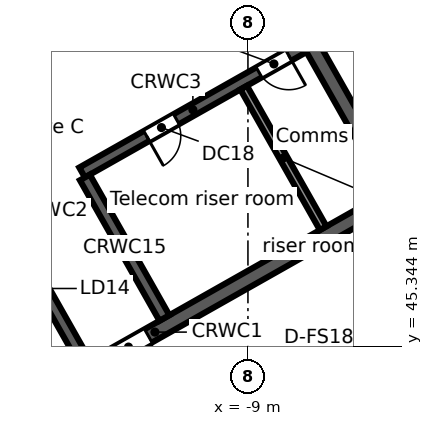
"""IFC4 building model, lengths in metres.
Left out: names, types, materials, properties, quantities, classifications, styles, units other than length and angle.
Written with IfcOpenShell. Run it as: python <this file> out.ifc"""

import sys

from ifc_helpers import new_model, si_unit, direction, frame, frame_2d, origin, place, context, subcontext, project, spatial, rectangle, extrude, element, fill, save


model = new_model("IFC4")
c1 = context("Model", 3, precision=1e-05, world=origin(), true_north=direction((0.0, 1.0)))
c2 = subcontext(c1, "Body", "Model", "MODEL_VIEW")
j1 = project(units=[si_unit("LENGTHUNIT", "METRE"), si_unit("PLANEANGLEUNIT", "RADIAN")], contexts=[c1])
p1 = place(None, origin())
s1 = spatial("IfcSite", under=j1, at=p1, CompositionType="ELEMENT")
p2 = place(p1, origin())
s2 = spatial("IfcBuilding", under=s1, at=p2, CompositionType="ELEMENT")
p3 = place(p2, frame((0.0, 0.0, 274.1)))
s3 = spatial("IfcBuildingStorey", under=s2, at=p3, CompositionType="ELEMENT", Elevation=274.1)
p4 = place(p3, frame((-58.732, 38.771, 0.0), z_axis=(0.0, 0.0, 1.0), x_axis=(0.870355615581, 0.492423702137, 0.0)))
e1 = element("IfcWall", 1, at=p4, inside=s3, PredefinedType="STANDARD", context=c2, shape_type="SweptSolid", body=[
    extrude(rectangle(XDim=64.052, YDim=0.25, at=frame_2d((32.026, 0.0))), origin(), (0.0, 0.0, 1.0), 3.52),
])
p5 = place(p4, frame((61.259, 0.0, 0.8)))
e2 = element("IfcOpeningElement", 2, at=p5, cuts=e1, PredefinedType="OPENING", context=c2, shape_type="SweptSolid", body=[
    extrude(rectangle(XDim=2.4, YDim=2.2, at=frame_2d((1.2, 1.1))), frame((0.0, 0.135, 0.0), z_axis=(0.0, -1.0, 0.0), x_axis=(1.0, 0.0, 0.0)), (0.0, 0.0, 1.0), 0.27),
])
p6 = place(p4, frame((58.216, 0.0, 0.8)))
e3 = element("IfcOpeningElement", 3, at=p6, cuts=e1, PredefinedType="OPENING", context=c2, shape_type="SweptSolid", body=[
    extrude(rectangle(XDim=2.4, YDim=2.2, at=frame_2d((1.2, 1.1))), frame((0.0, 0.135, 0.0), z_axis=(0.0, -1.0, 0.0), x_axis=(1.0, 0.0, 0.0)), (0.0, 0.0, 1.0), 0.27),
])
p7 = place(p4, frame((55.173, 0.0, 0.8)))
e4 = element("IfcOpeningElement", 4, at=p7, cuts=e1, PredefinedType="OPENING", context=c2, shape_type="SweptSolid", body=[
    extrude(rectangle(XDim=2.4, YDim=2.2, at=frame_2d((1.2, 1.1))), frame((0.0, 0.135, 0.0), z_axis=(0.0, -1.0, 0.0), x_axis=(1.0, 0.0, 0.0)), (0.0, 0.0, 1.0), 0.27),
])
p8 = place(p4, frame((52.129, 0.0, 0.8)))
e5 = element("IfcOpeningElement", 5, at=p8, cuts=e1, PredefinedType="OPENING", context=c2, shape_type="SweptSolid", body=[
    extrude(rectangle(XDim=2.4, YDim=2.2, at=frame_2d((1.2, 1.1))), frame((0.0, 0.135, 0.0), z_axis=(0.0, -1.0, 0.0), x_axis=(1.0, 0.0, 0.0)), (0.0, 0.0, 1.0), 0.27),
])
p9 = place(p4, frame((49.086, 0.0, 0.8)))
e6 = element("IfcOpeningElement", 6, at=p9, cuts=e1, PredefinedType="OPENING", context=c2, shape_type="SweptSolid", body=[
    extrude(rectangle(XDim=2.4, YDim=2.2, at=frame_2d((1.2, 1.1))), frame((0.0, 0.135, 0.0), z_axis=(0.0, -1.0, 0.0), x_axis=(1.0, 0.0, 0.0)), (0.0, 0.0, 1.0), 0.27),
])
p10 = place(p4, frame((46.043, 0.0, 0.8)))
e7 = element("IfcOpeningElement", 7, at=p10, cuts=e1, PredefinedType="OPENING", context=c2, shape_type="SweptSolid", body=[
    extrude(rectangle(XDim=2.4, YDim=2.2, at=frame_2d((1.2, 1.1))), frame((0.0, 0.135, 0.0), z_axis=(0.0, -1.0, 0.0), x_axis=(1.0, 0.0, 0.0)), (0.0, 0.0, 1.0), 0.27),
])
p11 = place(p4, frame((43.0, 0.0, 0.8)))
e8 = element("IfcOpeningElement", 8, at=p11, cuts=e1, PredefinedType="OPENING", context=c2, shape_type="SweptSolid", body=[
    extrude(rectangle(XDim=2.4, YDim=2.2, at=frame_2d((1.2, 1.1))), frame((0.0, 0.135, 0.0), z_axis=(0.0, -1.0, 0.0), x_axis=(1.0, 0.0, 0.0)), (0.0, 0.0, 1.0), 0.27),
])
p12 = place(p4, frame((39.956, 0.0, 0.8)))
e9 = element("IfcOpeningElement", 9, at=p12, cuts=e1, PredefinedType="OPENING", context=c2, shape_type="SweptSolid", body=[
    extrude(rectangle(XDim=2.4, YDim=2.2, at=frame_2d((1.2, 1.1))), frame((0.0, 0.135, 0.0), z_axis=(0.0, -1.0, 0.0), x_axis=(1.0, 0.0, 0.0)), (0.0, 0.0, 1.0), 0.27),
])
p13 = place(p4, frame((36.913, 0.0, 0.8)))
e10 = element("IfcOpeningElement", 10, at=p13, cuts=e1, PredefinedType="OPENING", context=c2, shape_type="SweptSolid", body=[
    extrude(rectangle(XDim=2.4, YDim=2.2, at=frame_2d((1.2, 1.1))), frame((0.0, 0.135, 0.0), z_axis=(0.0, -1.0, 0.0), x_axis=(1.0, 0.0, 0.0)), (0.0, 0.0, 1.0), 0.27),
])
p14 = place(p4, frame((33.87, 0.0, 0.8)))
e11 = element("IfcOpeningElement", 11, at=p14, cuts=e1, PredefinedType="OPENING", context=c2, shape_type="SweptSolid", body=[
    extrude(rectangle(XDim=2.4, YDim=2.2, at=frame_2d((1.2, 1.1))), frame((0.0, 0.135, 0.0), z_axis=(0.0, -1.0, 0.0), x_axis=(1.0, 0.0, 0.0)), (0.0, 0.0, 1.0), 0.27),
])
p15 = place(p4, frame((30.826, 0.0, 0.8)))
e12 = element("IfcOpeningElement", 12, at=p15, cuts=e1, PredefinedType="OPENING", context=c2, shape_type="SweptSolid", body=[
    extrude(rectangle(XDim=2.4, YDim=2.2, at=frame_2d((1.2, 1.1))), frame((0.0, 0.135, 0.0), z_axis=(0.0, -1.0, 0.0), x_axis=(1.0, 0.0, 0.0)), (0.0, 0.0, 1.0), 0.27),
])
p16 = place(p4, frame((27.783, 0.0, 0.8)))
e13 = element("IfcOpeningElement", 13, at=p16, cuts=e1, PredefinedType="OPENING", context=c2, shape_type="SweptSolid", body=[
    extrude(rectangle(XDim=2.4, YDim=2.2, at=frame_2d((1.2, 1.1))), frame((0.0, 0.135, 0.0), z_axis=(0.0, -1.0, 0.0), x_axis=(1.0, 0.0, 0.0)), (0.0, 0.0, 1.0), 0.27),
])
p17 = place(p4, frame((24.74, 0.0, 0.8)))
e14 = element("IfcOpeningElement", 14, at=p17, cuts=e1, PredefinedType="OPENING", context=c2, shape_type="SweptSolid", body=[
    extrude(rectangle(XDim=2.4, YDim=2.2, at=frame_2d((1.2, 1.1))), frame((0.0, 0.135, 0.0), z_axis=(0.0, -1.0, 0.0), x_axis=(1.0, 0.0, 0.0)), (0.0, 0.0, 1.0), 0.27),
])
p18 = place(p4, frame((21.696, 0.0, 0.8)))
e15 = element("IfcOpeningElement", 15, at=p18, cuts=e1, PredefinedType="OPENING", context=c2, shape_type="SweptSolid", body=[
    extrude(rectangle(XDim=2.4, YDim=2.2, at=frame_2d((1.2, 1.1))), frame((0.0, 0.135, 0.0), z_axis=(0.0, -1.0, 0.0), x_axis=(1.0, 0.0, 0.0)), (0.0, 0.0, 1.0), 0.27),
])
p19 = place(p4, frame((18.653, 0.0, 0.8)))
e16 = element("IfcOpeningElement", 16, at=p19, cuts=e1, PredefinedType="OPENING", context=c2, shape_type="SweptSolid", body=[
    extrude(rectangle(XDim=2.4, YDim=2.2, at=frame_2d((1.2, 1.1))), frame((0.0, 0.135, 0.0), z_axis=(0.0, -1.0, 0.0), x_axis=(1.0, 0.0, 0.0)), (0.0, 0.0, 1.0), 0.27),
])
p20 = place(p4, frame((15.61, 0.0, 0.8)))
e17 = element("IfcOpeningElement", 17, at=p20, cuts=e1, PredefinedType="OPENING", context=c2, shape_type="SweptSolid", body=[
    extrude(rectangle(XDim=2.4, YDim=2.2, at=frame_2d((1.2, 1.1))), frame((0.0, 0.135, 0.0), z_axis=(0.0, -1.0, 0.0), x_axis=(1.0, 0.0, 0.0)), (0.0, 0.0, 1.0), 0.27),
])
p21 = place(p4, frame((12.567, 0.0, 0.8)))
e18 = element("IfcOpeningElement", 18, at=p21, cuts=e1, PredefinedType="OPENING", context=c2, shape_type="SweptSolid", body=[
    extrude(rectangle(XDim=2.4, YDim=2.2, at=frame_2d((1.2, 1.1))), frame((0.0, 0.135, 0.0), z_axis=(0.0, -1.0, 0.0), x_axis=(1.0, 0.0, 0.0)), (0.0, 0.0, 1.0), 0.27),
])
p22 = place(p4, frame((9.523, 0.0, 0.8)))
e19 = element("IfcOpeningElement", 19, at=p22, cuts=e1, PredefinedType="OPENING", context=c2, shape_type="SweptSolid", body=[
    extrude(rectangle(XDim=2.4, YDim=2.2, at=frame_2d((1.2, 1.1))), frame((0.0, 0.135, 0.0), z_axis=(0.0, -1.0, 0.0), x_axis=(1.0, 0.0, 0.0)), (0.0, 0.0, 1.0), 0.27),
])
p23 = place(p4, frame((6.48, 0.0, 0.8)))
e20 = element("IfcOpeningElement", 20, at=p23, cuts=e1, PredefinedType="OPENING", context=c2, shape_type="SweptSolid", body=[
    extrude(rectangle(XDim=2.4, YDim=2.2, at=frame_2d((1.2, 1.1))), frame((0.0, 0.135, 0.0), z_axis=(0.0, -1.0, 0.0), x_axis=(1.0, 0.0, 0.0)), (0.0, 0.0, 1.0), 0.27),
])
p24 = place(p4, frame((3.437, 0.0, 0.8)))
e21 = element("IfcOpeningElement", 21, at=p24, cuts=e1, PredefinedType="OPENING", context=c2, shape_type="SweptSolid", body=[
    extrude(rectangle(XDim=2.4, YDim=2.2, at=frame_2d((1.2, 1.1))), frame((0.0, 0.135, 0.0), z_axis=(0.0, -1.0, 0.0), x_axis=(1.0, 0.0, 0.0)), (0.0, 0.0, 1.0), 0.27),
])
p25 = place(p4, frame((0.393, 0.0, 0.8)))
e22 = element("IfcOpeningElement", 22, at=p25, cuts=e1, PredefinedType="OPENING", context=c2, shape_type="SweptSolid", body=[
    extrude(rectangle(XDim=2.4, YDim=2.2, at=frame_2d((1.2, 1.1))), frame((0.0, 0.135, 0.0), z_axis=(0.0, -1.0, 0.0), x_axis=(1.0, 0.0, 0.0)), (0.0, 0.0, 1.0), 0.27),
])
p26 = place(p3, frame((-3.017, 46.293, 0.0), z_axis=(0.0, 0.0, 1.0), x_axis=(-0.870355474887, -0.492423950812, 0.0)))
e23 = element("IfcWall", 23, at=p26, inside=s3, PredefinedType="STANDARD", context=c2, shape_type="SweptSolid", body=[
    extrude(rectangle(XDim=40.34, YDim=0.25, at=frame_2d((20.17, 0.0))), origin(), (0.0, 0.0, 1.0), 3.52),
])
p27 = place(p26, frame((37.428, 0.0, 0.8)))
e24 = element("IfcOpeningElement", 24, at=p27, cuts=e23, PredefinedType="OPENING", context=c2, shape_type="SweptSolid", body=[
    extrude(rectangle(XDim=2.4, YDim=2.2, at=frame_2d((1.2, 1.1))), frame((0.0, 0.135, 0.0), z_axis=(0.0, -1.0, 0.0), x_axis=(1.0, 0.0, 0.0)), (0.0, 0.0, 1.0), 0.27),
])
p28 = place(p26, frame((34.372, 0.0, 0.0)))
e25 = element("IfcOpeningElement", 25, at=p28, cuts=e23, PredefinedType="OPENING", context=c2, shape_type="SweptSolid", body=[
    extrude(rectangle(XDim=1.8, YDim=2.4, at=frame_2d((0.9, 1.2))), frame((0.0, 0.135, 0.0), z_axis=(0.0, -1.0, 0.0), x_axis=(1.0, 0.0, 0.0)), (0.0, 0.0, 1.0), 0.27),
])
p29 = place(p26, frame((30.716, 0.0, 0.8)))
e26 = element("IfcOpeningElement", 26, at=p29, cuts=e23, PredefinedType="OPENING", context=c2, shape_type="SweptSolid", body=[
    extrude(rectangle(XDim=2.4, YDim=2.2, at=frame_2d((1.2, 1.1))), frame((0.0, 0.135, 0.0), z_axis=(0.0, -1.0, 0.0), x_axis=(1.0, 0.0, 0.0)), (0.0, 0.0, 1.0), 0.27),
])
p30 = place(p26, frame((27.36, 0.0, 0.8)))
e27 = element("IfcOpeningElement", 27, at=p30, cuts=e23, PredefinedType="OPENING", context=c2, shape_type="SweptSolid", body=[
    extrude(rectangle(XDim=2.4, YDim=2.2, at=frame_2d((1.2, 1.1))), frame((0.0, 0.135, 0.0), z_axis=(0.0, -1.0, 0.0), x_axis=(1.0, 0.0, 0.0)), (0.0, 0.0, 1.0), 0.27),
])
p31 = place(p26, frame((24.304, 0.0, 0.0)))
e28 = element("IfcOpeningElement", 28, at=p31, cuts=e23, PredefinedType="OPENING", context=c2, shape_type="SweptSolid", body=[
    extrude(rectangle(XDim=1.8, YDim=2.4, at=frame_2d((0.9, 1.2))), frame((0.0, 0.135, 0.0), z_axis=(0.0, -1.0, 0.0), x_axis=(1.0, 0.0, 0.0)), (0.0, 0.0, 1.0), 0.27),
])
p32 = place(p26, frame((20.648, 0.0, 0.8)))
e29 = element("IfcOpeningElement", 29, at=p32, cuts=e23, PredefinedType="OPENING", context=c2, shape_type="SweptSolid", body=[
    extrude(rectangle(XDim=2.4, YDim=2.2, at=frame_2d((1.2, 1.1))), frame((0.0, 0.135, 0.0), z_axis=(0.0, -1.0, 0.0), x_axis=(1.0, 0.0, 0.0)), (0.0, 0.0, 1.0), 0.27),
])
p33 = place(p26, frame((17.292, 0.0, 0.8)))
e30 = element("IfcOpeningElement", 30, at=p33, cuts=e23, PredefinedType="OPENING", context=c2, shape_type="SweptSolid", body=[
    extrude(rectangle(XDim=2.4, YDim=2.2, at=frame_2d((1.2, 1.1))), frame((0.0, 0.135, 0.0), z_axis=(0.0, -1.0, 0.0), x_axis=(1.0, 0.0, 0.0)), (0.0, 0.0, 1.0), 0.27),
])
p34 = place(p26, frame((14.236, 0.0, 0.0)))
e31 = element("IfcOpeningElement", 31, at=p34, cuts=e23, PredefinedType="OPENING", context=c2, shape_type="SweptSolid", body=[
    extrude(rectangle(XDim=1.8, YDim=2.4, at=frame_2d((0.9, 1.2))), frame((0.0, 0.135, 0.0), z_axis=(0.0, -1.0, 0.0), x_axis=(1.0, 0.0, 0.0)), (0.0, 0.0, 1.0), 0.27),
])
p35 = place(p26, frame((10.58, 0.0, 0.8)))
e32 = element("IfcOpeningElement", 32, at=p35, cuts=e23, PredefinedType="OPENING", context=c2, shape_type="SweptSolid", body=[
    extrude(rectangle(XDim=2.4, YDim=2.2, at=frame_2d((1.2, 1.1))), frame((0.0, 0.135, 0.0), z_axis=(0.0, -1.0, 0.0), x_axis=(1.0, 0.0, 0.0)), (0.0, 0.0, 1.0), 0.27),
])
p36 = place(p26, frame((7.224, 0.0, 0.8)))
e33 = element("IfcOpeningElement", 33, at=p36, cuts=e23, PredefinedType="OPENING", context=c2, shape_type="SweptSolid", body=[
    extrude(rectangle(XDim=2.4, YDim=2.2, at=frame_2d((1.2, 1.1))), frame((0.0, 0.135, 0.0), z_axis=(0.0, -1.0, 0.0), x_axis=(1.0, 0.0, 0.0)), (0.0, 0.0, 1.0), 0.27),
])
p37 = place(p26, frame((4.168, 0.0, 0.0)))
e34 = element("IfcOpeningElement", 34, at=p37, cuts=e23, PredefinedType="OPENING", context=c2, shape_type="SweptSolid", body=[
    extrude(rectangle(XDim=1.8, YDim=2.4, at=frame_2d((0.9, 1.2))), frame((0.0, 0.135, 0.0), z_axis=(0.0, -1.0, 0.0), x_axis=(1.0, 0.0, 0.0)), (0.0, 0.0, 1.0), 0.27),
])
p38 = place(p26, frame((0.512, 0.0, 0.8)))
e35 = element("IfcOpeningElement", 35, at=p38, cuts=e23, PredefinedType="OPENING", context=c2, shape_type="SweptSolid", body=[
    extrude(rectangle(XDim=2.4, YDim=2.2, at=frame_2d((1.2, 1.1))), frame((0.0, 0.135, 0.0), z_axis=(0.0, -1.0, 0.0), x_axis=(1.0, 0.0, 0.0)), (0.0, 0.0, 1.0), 0.27),
])
p39 = place(p3, frame((-17.975, 42.017, 0.0), z_axis=(0.0, 0.0, 1.0), x_axis=(0.87034965173, 0.492434243055, 0.0)))
e36 = element("IfcWall", 36, at=p39, inside=s3, PredefinedType="SOLIDWALL", context=c2, shape_type="SweptSolid", body=[
    extrude(rectangle(XDim=15.0, YDim=0.4, at=frame_2d((7.5, 0.0))), origin(), (0.0, 0.0, 1.0), 3.52),
])
p40 = place(p39, frame((6.1, 0.0, 0.0)))
e37 = element("IfcOpeningElement", 37, at=p40, cuts=e36, PredefinedType="OPENING", context=c2, shape_type="SweptSolid", body=[
    extrude(rectangle(XDim=1.2, YDim=2.1, at=frame_2d((0.6, 1.05))), frame((0.0, 0.21, 0.0), z_axis=(0.0, -1.0, 0.0), x_axis=(1.0, 0.0, 0.0)), (0.0, 0.0, 1.0), 0.42),
])
p41 = place(p3, frame((-13.365, 49.911, 0.0), z_axis=(0.0, 0.0, 1.0), x_axis=(0.870347618718, 0.492437836272, 0.0)))
e38 = element("IfcWall", 38, at=p41, inside=s3, PredefinedType="SOLIDWALL", context=c2, shape_type="SweptSolid", body=[
    extrude(rectangle(XDim=6.7, YDim=0.3, at=frame_2d((3.35, 0.0))), origin(), (0.0, 0.0, 1.0), 3.52),
])
p42 = place(p41, frame((1.95, 0.0, 0.0)))
e39 = element("IfcOpeningElement", 39, at=p42, cuts=e38, PredefinedType="OPENING", context=c2, shape_type="SweptSolid", body=[
    extrude(rectangle(XDim=0.9, YDim=2.1, at=frame_2d((0.45, 1.05))), frame((0.0, 0.16, 0.0), z_axis=(0.0, -1.0, 0.0), x_axis=(1.0, 0.0, 0.0)), (0.0, 0.0, 1.0), 0.32),
])
p43 = place(p41, frame((5.35, 0.0, 0.0)))
e40 = element("IfcOpeningElement", 40, at=p43, cuts=e38, PredefinedType="OPENING", context=c2, shape_type="SweptSolid", body=[
    extrude(rectangle(XDim=0.9, YDim=2.1, at=frame_2d((0.45, 1.05))), frame((0.0, 0.16, 0.0), z_axis=(0.0, -1.0, 0.0), x_axis=(1.0, 0.0, 0.0)), (0.0, 0.0, 1.0), 0.32),
])
p44 = place(p3, frame((-15.379, 48.599, 0.0), z_axis=(0.0, 0.0, 1.0), x_axis=(0.492422543467, -0.870356271124, 0.0)))
e41 = element("IfcWall", 41, at=p44, inside=s3, PredefinedType="SOLIDWALL", context=c2, shape_type="SweptSolid", body=[
    extrude(rectangle(XDim=4.25, YDim=0.3, at=frame_2d((2.125, 0.0))), origin(), (0.0, 0.0, 1.0), 3.52),
])
p45 = place(p3, frame((-13.291, 49.781, 0.0), z_axis=(0.0, 0.0, 1.0), x_axis=(0.492397924348, -0.870370199454, 0.0)))
e42 = element("IfcWall", 42, at=p45, inside=s3, PredefinedType="SOLIDWALL", context=c2, shape_type="SweptSolid", body=[
    extrude(rectangle(XDim=4.25, YDim=0.3, at=frame_2d((2.125, 0.0))), origin(), (0.0, 0.0, 1.0), 3.52),
])
p46 = place(p3, frame((-9.113, 52.144, 0.0), z_axis=(0.0, 0.0, 1.0), x_axis=(0.492422543467, -0.870356271124, 0.0)))
e43 = element("IfcWall", 43, at=p46, inside=s3, PredefinedType="PARTITIONING", context=c2, shape_type="SweptSolid", body=[
    extrude(rectangle(XDim=4.25, YDim=0.2, at=frame_2d((2.125, 0.0))), origin(), (0.0, 0.0, 1.0), 3.52),
])
p47 = place(p3, frame((-11.692, 60.968, 0.0), z_axis=(0.0, 0.0, 1.0), x_axis=(0.492421663121, -0.870356769198, 0.0)))
e44 = element("IfcWall", 44, at=p47, inside=s3, PredefinedType="SOLIDWALL", context=c2, shape_type="SweptSolid", body=[
    extrude(rectangle(XDim=13.2, YDim=0.4, at=frame_2d((6.6, 0.0))), origin(), (0.0, 0.0, 1.0), 3.52),
])
p48 = place(p40, frame((1.2, 0.0, 0.0), z_axis=(0.0, 0.0, 1.0), x_axis=(-1.0, 0.0, 0.0)))
e45 = element("IfcDoor", 45, at=p48, inside=s3, OperationType="SINGLE_SWING_RIGHT", PredefinedType="DOOR", context=c2, shape_type="SweptSolid", body=[
    extrude(rectangle(XDim=1.2, YDim=2.1, at=frame_2d((0.6, 1.05))), frame((0.0, 0.025, 0.0), z_axis=(0.0, -1.0, 0.0), x_axis=(1.0, 0.0, 0.0)), (0.0, 0.0, 1.0), 0.05),
])
fill(e37, e45)
p49 = place(p42, frame((0.9, 0.0, 0.0), z_axis=(0.0, 0.0, 1.0), x_axis=(-1.0, 0.0, 0.0)))
e46 = element("IfcDoor", 46, at=p49, inside=s3, OperationType="SINGLE_SWING_RIGHT", PredefinedType="DOOR", context=c2, shape_type="SweptSolid", body=[
    extrude(rectangle(XDim=0.9, YDim=2.1, at=frame_2d((0.45, 1.05))), frame((0.0, 0.025, 0.0), z_axis=(0.0, -1.0, 0.0), x_axis=(1.0, 0.0, 0.0)), (0.0, 0.0, 1.0), 0.05),
])
fill(e39, e46)
p50 = place(p43, frame((0.9, 0.0, 0.0), z_axis=(0.0, 0.0, 1.0), x_axis=(-1.0, 0.0, 0.0)))
e47 = element("IfcDoor", 47, at=p50, inside=s3, OperationType="SINGLE_SWING_LEFT", PredefinedType="DOOR", context=c2, shape_type="SweptSolid", body=[
    extrude(rectangle(XDim=0.9, YDim=2.1, at=frame_2d((0.45, 1.05))), frame((0.0, 0.025, 0.0), z_axis=(0.0, -1.0, 0.0), x_axis=(1.0, 0.0, 0.0)), (0.0, 0.0, 1.0), 0.05),
])
fill(e40, e47)
save(model, sys.argv[1])
